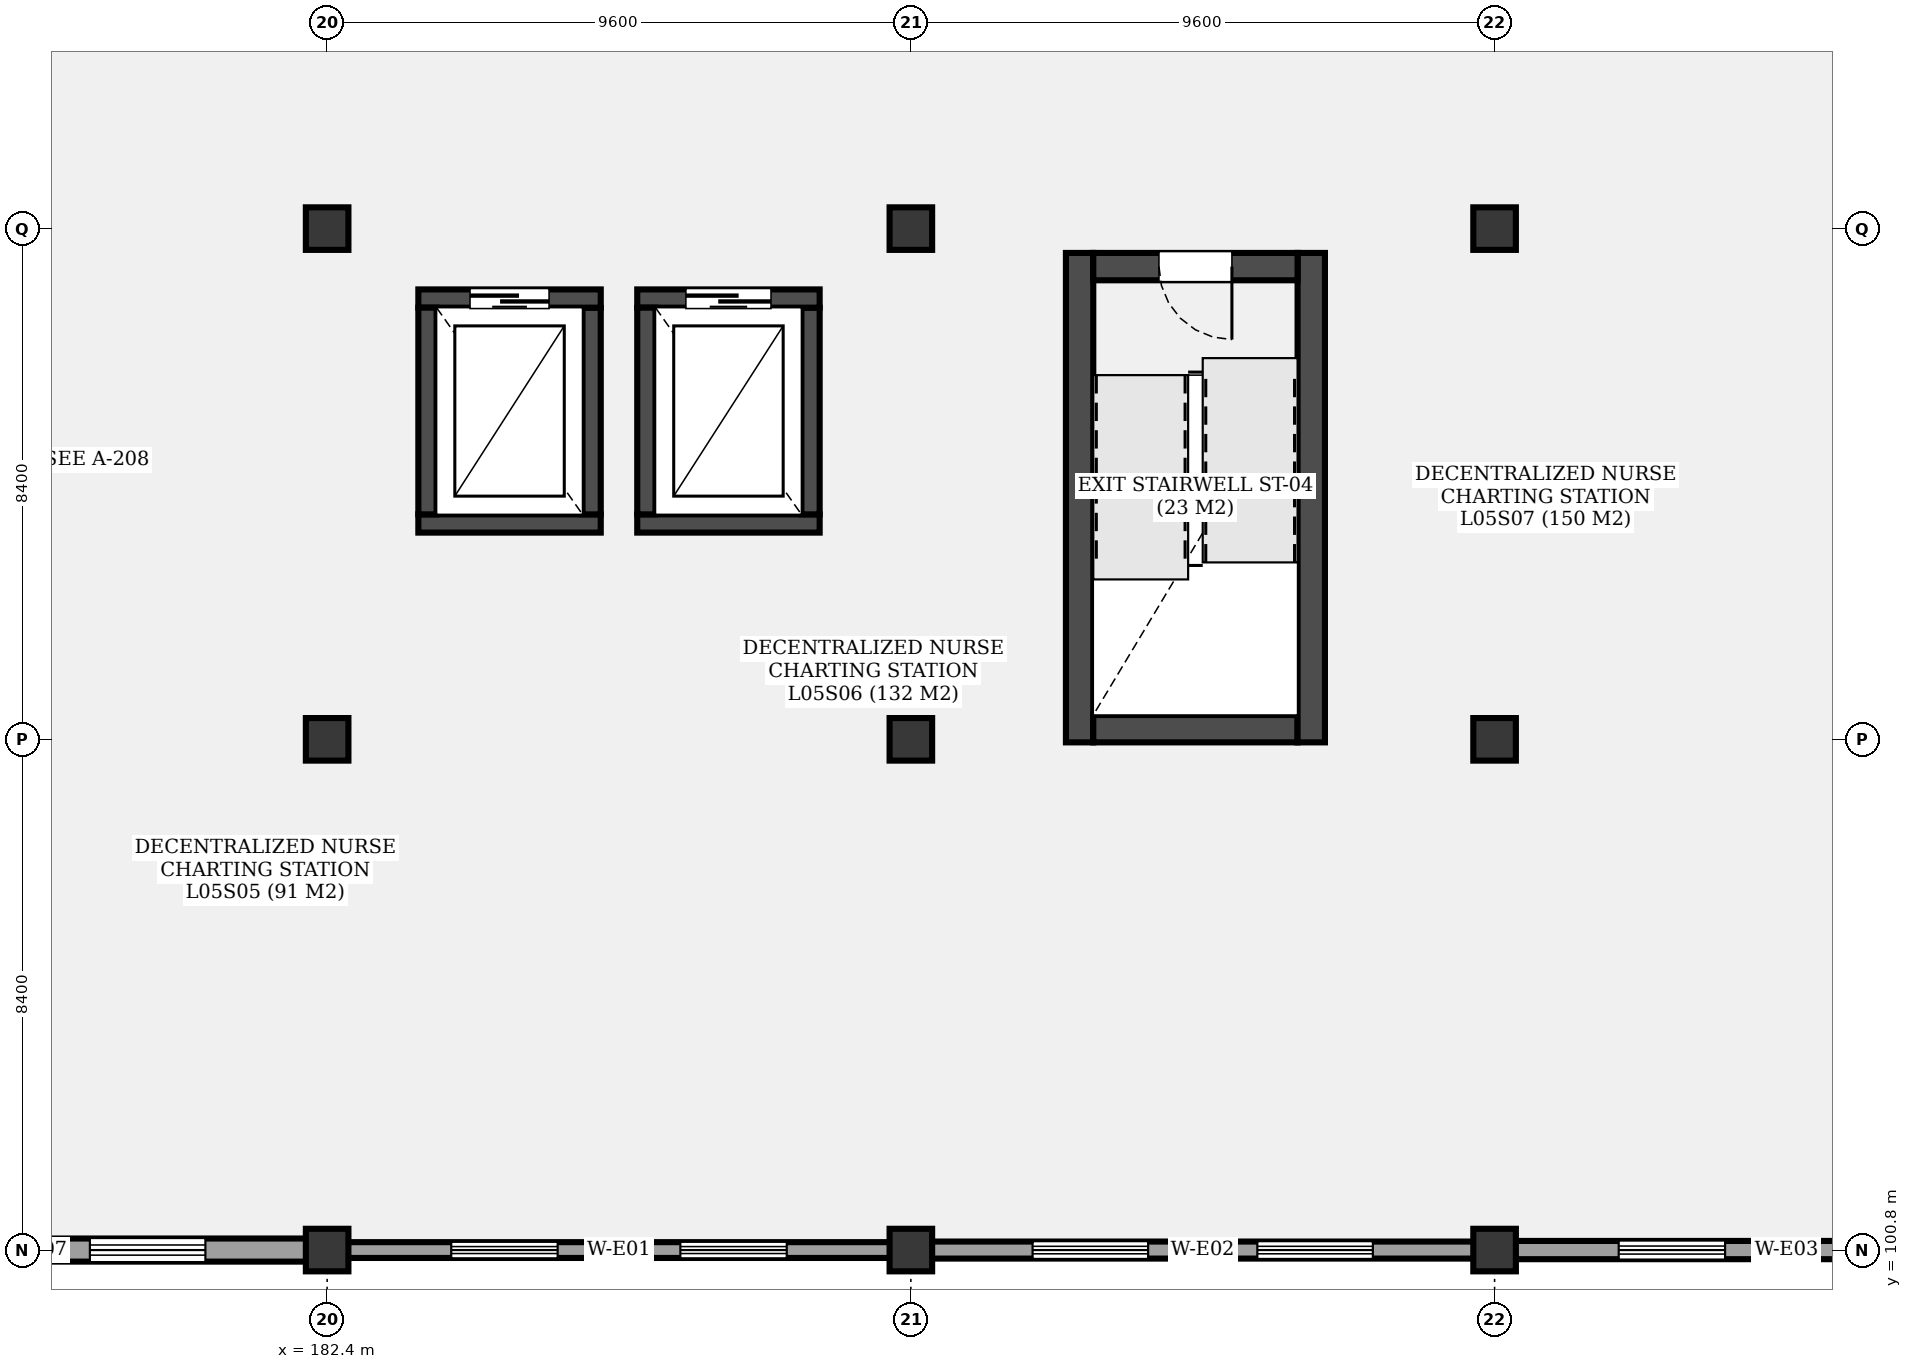
"""IFC4 building model, lengths in metres.
Left out: names, types, materials, properties, quantities, classifications, styles, units other than length and angle.
Written with IfcOpenShell. Run it as: python <this file> out.ifc"""

import sys

from ifc_helpers import new_model, si_unit, direction, frame, frame_2d, origin, origin_2d, place, context, subcontext, project, spatial, rectangle, extrude, element, fill, save


model = new_model("IFC4")
c1 = context("Model", 3, precision=1e-05, world=origin(), true_north=direction((0.0, 1.0)))
c2 = subcontext(c1, "Body", "Model", "MODEL_VIEW")
j1 = project(units=[si_unit("LENGTHUNIT", "METRE"), si_unit("PLANEANGLEUNIT", "RADIAN")], contexts=[c1])
p1 = place(None, origin())
s1 = spatial("IfcSite", under=j1, at=p1, CompositionType="ELEMENT")
p2 = place(p1, origin())
s2 = spatial("IfcBuilding", under=s1, at=p2, CompositionType="ELEMENT")
p3 = place(p2, frame((0.0, 0.0, 22.0)))
s3 = spatial("IfcBuildingStorey", under=s2, at=p3, CompositionType="ELEMENT", Elevation=22.0)
for number, where, z_axis, x_axis in (
    (1, (182.4, 100.8, 0.0), (0.0, 0.0, 1.0), (1.0, 0.0, 0.0)),
    (2, (182.4, 109.2, 0.0), (0.0, 0.0, 1.0), (1.0, 0.0, 0.0)),
    (3, (182.4, 117.6, 0.0), (0.0, 0.0, 1.0), (1.0, 0.0, 0.0)),
    (4, (192.0, 100.8, 0.0), (0.0, 0.0, 1.0), (1.0, 0.0, 0.0)),
    (5, (192.0, 109.2, 0.0), (0.0, 0.0, 1.0), (1.0, 0.0, 0.0)),
    (6, (192.0, 117.6, 0.0), (0.0, 0.0, 1.0), (1.0, 0.0, 0.0)),
    (7, (201.6, 100.8, 0.0), (0.0, 0.0, 1.0), (1.0, 0.0, 0.0)),
    (8, (201.6, 109.2, 0.0), (0.0, 0.0, 1.0), (1.0, 0.0, 0.0)),
    (9, (201.6, 117.6, 0.0), (0.0, 0.0, 1.0), (1.0, 0.0, 0.0)),
):
    element("IfcColumn", number, at=place(p3, frame(where, z_axis=z_axis, x_axis=x_axis)), inside=s3, PredefinedType="COLUMN", context=c2, shape_type="SweptSolid", body=[
        extrude(rectangle(XDim=0.7, YDim=0.7, at=origin_2d()), origin(), (0.0, 0.0, 1.0), 4.2),
    ])
p4 = place(p3, frame((194.775, 117.2, 0.0), z_axis=(0.0, 0.0, 1.0), x_axis=(0.0, -1.0, 0.0)))
e10 = element("IfcWall", 10, at=p4, inside=s3, PredefinedType="SHEAR", context=c2, shape_type="SweptSolid", body=[
    extrude(rectangle(XDim=8.05, YDim=0.45, at=frame_2d((4.025, 0.0))), origin(), (0.0, 0.0, 1.0), 4.2),
])
p5 = place(p3, frame((195.0, 109.375, 0.0), z_axis=(0.0, 0.0, 1.0), x_axis=(1.0, 0.0, 0.0)))
e11 = element("IfcWall", 11, at=p5, inside=s3, PredefinedType="SHEAR", context=c2, shape_type="SweptSolid", body=[
    extrude(rectangle(XDim=3.36, YDim=0.45, at=frame_2d((1.68, 0.0))), origin(), (0.0, 0.0, 1.0), 4.2),
])
p6 = place(p3, frame((198.585, 109.15, 0.0), z_axis=(0.0, 0.0, 1.0), x_axis=(0.0, 1.0, 0.0)))
e12 = element("IfcWall", 12, at=p6, inside=s3, PredefinedType="SHEAR", context=c2, shape_type="SweptSolid", body=[
    extrude(rectangle(XDim=8.05, YDim=0.45, at=frame_2d((4.025, 0.0))), origin(), (0.0, 0.0, 1.0), 4.2),
])
p7 = place(p3, frame((198.36, 116.975, 0.0), z_axis=(0.0, 0.0, 1.0), x_axis=(-1.0, 0.0, 0.0)))
e13 = element("IfcWall", 13, at=p7, inside=s3, PredefinedType="SHEAR", context=c2, shape_type="SweptSolid", body=[
    extrude(rectangle(XDim=3.36, YDim=0.45, at=frame_2d((1.68, 0.0))), origin(), (0.0, 0.0, 1.0), 4.2),
])
p8 = place(p7, frame((1.08, 0.0, 0.0)))
e14 = element("IfcOpeningElement", 14, at=p8, cuts=e13, PredefinedType="OPENING", context=c2, shape_type="SweptSolid", body=[
    extrude(rectangle(XDim=1.2, YDim=2.2, at=frame_2d((0.6, 1.1))), frame((0.0, 0.235, 0.0), z_axis=(0.0, -1.0, 0.0), x_axis=(1.0, 0.0, 0.0)), (0.0, 0.0, 1.0), 0.47),
])
p9 = place(p3, frame((183.9, 112.75, 0.0), z_axis=(0.0, 0.0, 1.0), x_axis=(1.0, 0.0, 0.0)))
e15 = element("IfcWall", 15, at=p9, inside=s3, PredefinedType="SHEAR", context=c2, shape_type="SweptSolid", body=[
    extrude(rectangle(XDim=3.0, YDim=0.3, at=frame_2d((1.5, 0.0))), origin(), (0.0, 0.0, 1.0), 4.2),
])
p10 = place(p3, frame((186.75, 112.9, 0.0), z_axis=(0.0, 0.0, 1.0), x_axis=(0.0, 1.0, 0.0)))
e16 = element("IfcWall", 16, at=p10, inside=s3, PredefinedType="SHEAR", context=c2, shape_type="SweptSolid", body=[
    extrude(rectangle(XDim=3.4, YDim=0.3, at=frame_2d((1.7, 0.0))), origin(), (0.0, 0.0, 1.0), 4.2),
])
p11 = place(p3, frame((186.9, 116.45, 0.0), z_axis=(0.0, 0.0, 1.0), x_axis=(-1.0, 0.0, 0.0)))
e17 = element("IfcWall", 17, at=p11, inside=s3, PredefinedType="SHEAR", context=c2, shape_type="SweptSolid", body=[
    extrude(rectangle(XDim=3.0, YDim=0.3, at=frame_2d((1.5, 0.0))), origin(), (0.0, 0.0, 1.0), 4.2),
])
p12 = place(p11, frame((0.85, 0.0, 0.0)))
e18 = element("IfcOpeningElement", 18, at=p12, cuts=e17, PredefinedType="OPENING", context=c2, shape_type="SweptSolid", body=[
    extrude(rectangle(XDim=1.3, YDim=2.3, at=frame_2d((0.65, 1.15))), frame((0.0, 0.16, 0.0), z_axis=(0.0, -1.0, 0.0), x_axis=(1.0, 0.0, 0.0)), (0.0, 0.0, 1.0), 0.32),
])
p13 = place(p3, frame((184.05, 116.3, 0.0), z_axis=(0.0, 0.0, 1.0), x_axis=(0.0, -1.0, 0.0)))
e19 = element("IfcWall", 19, at=p13, inside=s3, PredefinedType="SHEAR", context=c2, shape_type="SweptSolid", body=[
    extrude(rectangle(XDim=3.4, YDim=0.3, at=frame_2d((1.7, 0.0))), origin(), (0.0, 0.0, 1.0), 4.2),
])
p14 = place(p3, frame((187.5, 112.75, 0.0), z_axis=(0.0, 0.0, 1.0), x_axis=(1.0, 0.0, 0.0)))
e20 = element("IfcWall", 20, at=p14, inside=s3, PredefinedType="SHEAR", context=c2, shape_type="SweptSolid", body=[
    extrude(rectangle(XDim=3.0, YDim=0.3, at=frame_2d((1.5, 0.0))), origin(), (0.0, 0.0, 1.0), 4.2),
])
p15 = place(p3, frame((190.35, 112.9, 0.0), z_axis=(0.0, 0.0, 1.0), x_axis=(0.0, 1.0, 0.0)))
e21 = element("IfcWall", 21, at=p15, inside=s3, PredefinedType="SHEAR", context=c2, shape_type="SweptSolid", body=[
    extrude(rectangle(XDim=3.4, YDim=0.3, at=frame_2d((1.7, 0.0))), origin(), (0.0, 0.0, 1.0), 4.2),
])
p16 = place(p3, frame((190.5, 116.45, 0.0), z_axis=(0.0, 0.0, 1.0), x_axis=(-1.0, 0.0, 0.0)))
e22 = element("IfcWall", 22, at=p16, inside=s3, PredefinedType="SHEAR", context=c2, shape_type="SweptSolid", body=[
    extrude(rectangle(XDim=3.0, YDim=0.3, at=frame_2d((1.5, 0.0))), origin(), (0.0, 0.0, 1.0), 4.2),
])
p17 = place(p16, frame((0.8, 0.0, 0.0)))
e23 = element("IfcOpeningElement", 23, at=p17, cuts=e22, PredefinedType="OPENING", context=c2, shape_type="SweptSolid", body=[
    extrude(rectangle(XDim=1.4, YDim=2.3, at=frame_2d((0.7, 1.15))), frame((0.0, 0.16, 0.0), z_axis=(0.0, -1.0, 0.0), x_axis=(1.0, 0.0, 0.0)), (0.0, 0.0, 1.0), 0.32),
])
p18 = place(p3, frame((187.65, 116.3, 0.0), z_axis=(0.0, 0.0, 1.0), x_axis=(0.0, -1.0, 0.0)))
e24 = element("IfcWall", 24, at=p18, inside=s3, PredefinedType="SHEAR", context=c2, shape_type="SweptSolid", body=[
    extrude(rectangle(XDim=3.4, YDim=0.3, at=frame_2d((1.7, 0.0))), origin(), (0.0, 0.0, 1.0), 4.2),
])
p19 = place(p3, frame((182.4, 100.8, 0.0), z_axis=(0.0, 0.0, 1.0), x_axis=(-1.0, 0.0, 0.0)))
e25 = element("IfcWall", 25, at=p19, inside=s3, PredefinedType="SOLIDWALL", context=c2, shape_type="SweptSolid", body=[
    extrude(rectangle(XDim=9.6, YDim=0.38, at=frame_2d((4.8, 0.0))), origin(), (0.0, 0.0, 1.0), 3.39),
])
p20 = place(p19, frame((2.002, 0.0, 0.85)))
e26 = element("IfcOpeningElement", 26, at=p20, cuts=e25, PredefinedType="OPENING", context=c2, shape_type="SweptSolid", body=[
    extrude(rectangle(XDim=1.9, YDim=1.4, at=frame_2d((0.95, 0.7))), frame((0.0, 0.2, 0.0), z_axis=(0.0, -1.0, 0.0), x_axis=(1.0, 0.0, 0.0)), (0.0, 0.0, 1.0), 0.4),
])
p21 = place(p19, frame((5.698, 0.0, 0.85)))
e27 = element("IfcOpeningElement", 27, at=p21, cuts=e25, PredefinedType="OPENING", context=c2, shape_type="SweptSolid", body=[
    extrude(rectangle(XDim=1.9, YDim=1.4, at=frame_2d((0.95, 0.7))), frame((0.0, 0.2, 0.0), z_axis=(0.0, -1.0, 0.0), x_axis=(1.0, 0.0, 0.0)), (0.0, 0.0, 1.0), 0.4),
])
p22 = place(p3, frame((192.0, 100.8, 0.0), z_axis=(0.0, 0.0, 1.0), x_axis=(-1.0, 0.0, 0.0)))
e28 = element("IfcWall", 28, at=p22, inside=s3, PredefinedType="SOLIDWALL", context=c2, shape_type="SweptSolid", body=[
    extrude(rectangle(XDim=9.6, YDim=0.26, at=frame_2d((4.8, 0.0))), origin(), (0.0, 0.0, 1.0), 3.39),
])
p23 = place(p22, frame((2.041, 0.0, 0.85)))
e29 = element("IfcOpeningElement", 29, at=p23, cuts=e28, PredefinedType="OPENING", context=c2, shape_type="SweptSolid", body=[
    extrude(rectangle(XDim=1.75, YDim=1.4, at=frame_2d((0.875, 0.7))), frame((0.0, 0.14, 0.0), z_axis=(0.0, -1.0, 0.0), x_axis=(1.0, 0.0, 0.0)), (0.0, 0.0, 1.0), 0.28),
])
p24 = place(p22, frame((5.809, 0.0, 0.85)))
e30 = element("IfcOpeningElement", 30, at=p24, cuts=e28, PredefinedType="OPENING", context=c2, shape_type="SweptSolid", body=[
    extrude(rectangle(XDim=1.75, YDim=1.4, at=frame_2d((0.875, 0.7))), frame((0.0, 0.14, 0.0), z_axis=(0.0, -1.0, 0.0), x_axis=(1.0, 0.0, 0.0)), (0.0, 0.0, 1.0), 0.28),
])
p25 = place(p3, frame((201.6, 100.8, 0.0), z_axis=(0.0, 0.0, 1.0), x_axis=(-1.0, 0.0, 0.0)))
e31 = element("IfcWall", 31, at=p25, inside=s3, PredefinedType="SOLIDWALL", context=c2, shape_type="SweptSolid", body=[
    extrude(rectangle(XDim=9.6, YDim=0.28, at=frame_2d((4.8, 0.0))), origin(), (0.0, 0.0, 1.0), 3.39),
])
p26 = place(p25, frame((2.002, 0.0, 0.85)))
e32 = element("IfcOpeningElement", 32, at=p26, cuts=e31, PredefinedType="OPENING", context=c2, shape_type="SweptSolid", body=[
    extrude(rectangle(XDim=1.9, YDim=1.4, at=frame_2d((0.95, 0.7))), frame((0.0, 0.15, 0.0), z_axis=(0.0, -1.0, 0.0), x_axis=(1.0, 0.0, 0.0)), (0.0, 0.0, 1.0), 0.3),
])
p27 = place(p25, frame((5.698, 0.0, 0.85)))
e33 = element("IfcOpeningElement", 33, at=p27, cuts=e31, PredefinedType="OPENING", context=c2, shape_type="SweptSolid", body=[
    extrude(rectangle(XDim=1.9, YDim=1.4, at=frame_2d((0.95, 0.7))), frame((0.0, 0.15, 0.0), z_axis=(0.0, -1.0, 0.0), x_axis=(1.0, 0.0, 0.0)), (0.0, 0.0, 1.0), 0.3),
])
p28 = place(p3, frame((211.2, 100.8, 0.0), z_axis=(0.0, 0.0, 1.0), x_axis=(-1.0, 0.0, 0.0)))
e34 = element("IfcWall", 34, at=p28, inside=s3, PredefinedType="SOLIDWALL", context=c2, shape_type="SweptSolid", body=[
    extrude(rectangle(XDim=9.6, YDim=0.3, at=frame_2d((4.8, 0.0))), origin(), (0.0, 0.0, 1.0), 3.39),
])
p29 = place(p28, frame((2.041, 0.0, 0.85)))
e35 = element("IfcOpeningElement", 35, at=p29, cuts=e34, PredefinedType="OPENING", context=c2, shape_type="SweptSolid", body=[
    extrude(rectangle(XDim=1.75, YDim=1.4, at=frame_2d((0.875, 0.7))), frame((0.0, 0.16, 0.0), z_axis=(0.0, -1.0, 0.0), x_axis=(1.0, 0.0, 0.0)), (0.0, 0.0, 1.0), 0.32),
])
p30 = place(p28, frame((5.809, 0.0, 0.85)))
e36 = element("IfcOpeningElement", 36, at=p30, cuts=e34, PredefinedType="OPENING", context=c2, shape_type="SweptSolid", body=[
    extrude(rectangle(XDim=1.75, YDim=1.4, at=frame_2d((0.875, 0.7))), frame((0.0, 0.16, 0.0), z_axis=(0.0, -1.0, 0.0), x_axis=(1.0, 0.0, 0.0)), (0.0, 0.0, 1.0), 0.32),
])
p31 = place(p8, origin())
e37 = element("IfcDoor", 37, at=p31, inside=s3, OperationType="SINGLE_SWING_LEFT", PredefinedType="DOOR", context=c2, shape_type="SweptSolid", body=[
    extrude(rectangle(XDim=1.2, YDim=2.2, at=frame_2d((0.6, 1.1))), frame((0.0, 0.025, 0.0), z_axis=(0.0, -1.0, 0.0), x_axis=(1.0, 0.0, 0.0)), (0.0, 0.0, 1.0), 0.05),
])
fill(e14, e37)
p32 = place(p12, origin())
e38 = element("IfcDoor", 38, at=p32, inside=s3, OperationType="SLIDING_TO_RIGHT", PredefinedType="DOOR", context=c2, shape_type="SweptSolid", body=[
    extrude(rectangle(XDim=1.3, YDim=2.3, at=frame_2d((0.65, 1.15))), frame((0.0, 0.025, 0.0), z_axis=(0.0, -1.0, 0.0), x_axis=(1.0, 0.0, 0.0)), (0.0, 0.0, 1.0), 0.05),
])
fill(e18, e38)
p33 = place(p17, origin())
e39 = element("IfcDoor", 39, at=p33, inside=s3, OperationType="SLIDING_TO_RIGHT", PredefinedType="DOOR", context=c2, shape_type="SweptSolid", body=[
    extrude(rectangle(XDim=1.4, YDim=2.3, at=frame_2d((0.7, 1.15))), frame((0.0, 0.025, 0.0), z_axis=(0.0, -1.0, 0.0), x_axis=(1.0, 0.0, 0.0)), (0.0, 0.0, 1.0), 0.05),
])
fill(e23, e39)
p34 = place(p20, origin())
e40 = element("IfcWindow", 40, at=p34, inside=s3, PartitioningType="SINGLE_PANEL", PredefinedType="WINDOW", context=c2, shape_type="SweptSolid", body=[
    extrude(rectangle(XDim=1.9, YDim=1.4, at=frame_2d((0.95, 0.7))), frame((0.0, 0.03, 0.0), z_axis=(0.0, -1.0, 0.0), x_axis=(1.0, 0.0, 0.0)), (0.0, 0.0, 1.0), 0.06),
])
fill(e26, e40)
p35 = place(p23, origin())
e41 = element("IfcWindow", 41, at=p35, inside=s3, PartitioningType="SINGLE_PANEL", PredefinedType="WINDOW", context=c2, shape_type="SweptSolid", body=[
    extrude(rectangle(XDim=1.75, YDim=1.4, at=frame_2d((0.875, 0.7))), frame((0.0, 0.03, 0.0), z_axis=(0.0, -1.0, 0.0), x_axis=(1.0, 0.0, 0.0)), (0.0, 0.0, 1.0), 0.06),
])
fill(e29, e41)
p36 = place(p24, origin())
e42 = element("IfcWindow", 42, at=p36, inside=s3, PartitioningType="SINGLE_PANEL", PredefinedType="WINDOW", context=c2, shape_type="SweptSolid", body=[
    extrude(rectangle(XDim=1.75, YDim=1.4, at=frame_2d((0.875, 0.7))), frame((0.0, 0.03, 0.0), z_axis=(0.0, -1.0, 0.0), x_axis=(1.0, 0.0, 0.0)), (0.0, 0.0, 1.0), 0.06),
])
fill(e30, e42)
p37 = place(p26, origin())
e43 = element("IfcWindow", 43, at=p37, inside=s3, PartitioningType="SINGLE_PANEL", PredefinedType="WINDOW", context=c2, shape_type="SweptSolid", body=[
    extrude(rectangle(XDim=1.9, YDim=1.4, at=frame_2d((0.95, 0.7))), frame((0.0, 0.03, 0.0), z_axis=(0.0, -1.0, 0.0), x_axis=(1.0, 0.0, 0.0)), (0.0, 0.0, 1.0), 0.06),
])
fill(e32, e43)
p38 = place(p27, origin())
e44 = element("IfcWindow", 44, at=p38, inside=s3, PartitioningType="SINGLE_PANEL", PredefinedType="WINDOW", context=c2, shape_type="SweptSolid", body=[
    extrude(rectangle(XDim=1.9, YDim=1.4, at=frame_2d((0.95, 0.7))), frame((0.0, 0.03, 0.0), z_axis=(0.0, -1.0, 0.0), x_axis=(1.0, 0.0, 0.0)), (0.0, 0.0, 1.0), 0.06),
])
fill(e33, e44)
p39 = place(p30, origin())
e45 = element("IfcWindow", 45, at=p39, inside=s3, PartitioningType="SINGLE_PANEL", PredefinedType="WINDOW", context=c2, shape_type="SweptSolid", body=[
    extrude(rectangle(XDim=1.75, YDim=1.4, at=frame_2d((0.875, 0.7))), frame((0.0, 0.03, 0.0), z_axis=(0.0, -1.0, 0.0), x_axis=(1.0, 0.0, 0.0)), (0.0, 0.0, 1.0), 0.06),
])
fill(e36, e45)
save(model, sys.argv[1])
